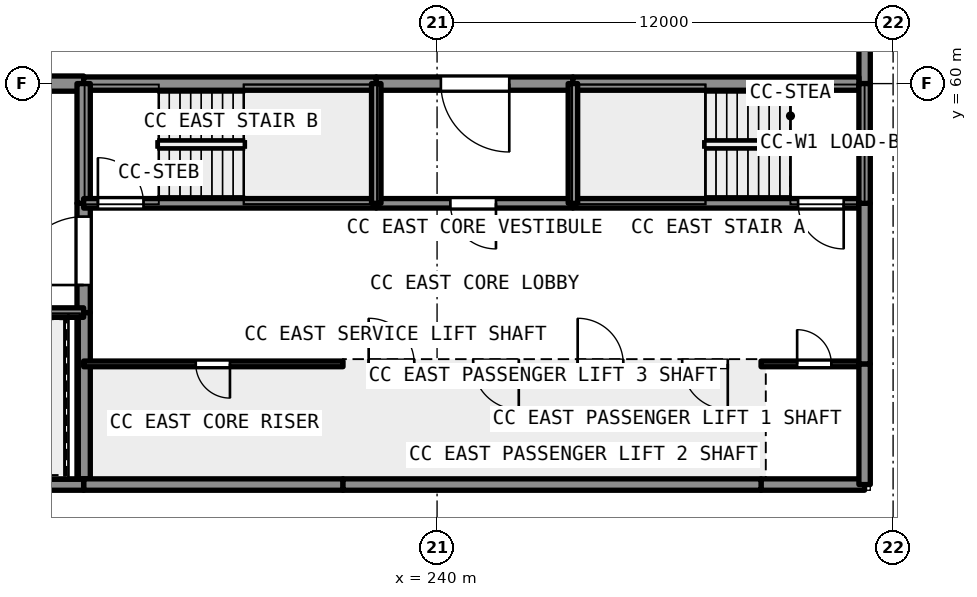
"""IFC4 building model, lengths in metres.
Left out: names, types, materials, properties, quantities, classifications, styles, units other than length and angle.
Written with IfcOpenShell. Run it as: python <this file> out.ifc"""

import sys

from ifc_helpers import new_model, si_unit, direction, frame, frame_2d, origin, place, context, subcontext, project, spatial, rectangle, extrude, element, fill, save


model = new_model("IFC4")
c1 = context("Model", 3, precision=1e-05, world=origin(), true_north=direction((0.0, 1.0)))
c2 = subcontext(c1, "Body", "Model", "MODEL_VIEW")
j1 = project(units=[si_unit("LENGTHUNIT", "METRE"), si_unit("PLANEANGLEUNIT", "RADIAN")], contexts=[c1])
p1 = place(None, origin())
s1 = spatial("IfcSite", under=j1, at=p1, CompositionType="ELEMENT")
p2 = place(p1, origin())
s2 = spatial("IfcBuilding", under=s1, at=p2, CompositionType="ELEMENT")
p3 = place(p2, frame((0.0, 0.0, 15.0)))
s3 = spatial("IfcBuildingStorey", under=s2, at=p3, CompositionType="ELEMENT", Elevation=15.0)
p4 = place(p3, frame((230.7, 60.0, 0.0), z_axis=(0.0, 0.0, 1.0), x_axis=(-1.0, 0.0, 0.0)))
e1 = element("IfcWall", 1, at=p4, inside=s3, PredefinedType="SHEAR", context=c2, shape_type="SweptSolid", body=[
    extrude(rectangle(XDim=9.6, YDim=0.4, at=frame_2d((4.8, 0.0))), origin(), (0.0, 0.0, 1.0), 5.4),
])
p5 = place(p4, frame((3.0, 0.0, 0.0)))
e2 = element("IfcOpeningElement", 2, at=p5, cuts=e1, PredefinedType="OPENING", context=c2, shape_type="SweptSolid", body=[
    extrude(rectangle(XDim=2.4, YDim=2.4, at=frame_2d((1.2, 1.2))), frame((0.0, 0.21, 0.0), z_axis=(0.0, -1.0, 0.0), x_axis=(1.0, 0.0, 0.0)), (0.0, 0.0, 1.0), 0.421),
])
p6 = place(p3, frame((251.25, 60.0, 0.0), z_axis=(0.0, 0.0, 1.0), x_axis=(0.0, 1.0, 0.0)))
e3 = element("IfcWall", 3, at=p6, inside=s3, PredefinedType="SOLIDWALL", context=c2, shape_type="SweptSolid", body=[
    extrude(rectangle(XDim=50.55, YDim=0.3, at=frame_2d((25.275, 0.0))), origin(), (0.0, 0.0, 1.0), 5.4),
])
p7 = place(p3, frame((230.7, 60.0, 0.0), z_axis=(0.0, 0.0, 1.0), x_axis=(1.0, 0.0, 0.0)))
e4 = element("IfcWall", 4, at=p7, inside=s3, PredefinedType="SHEAR", context=c2, shape_type="SweptSolid", body=[
    extrude(rectangle(XDim=7.7, YDim=0.35, at=frame_2d((3.85, 0.0))), origin(), (0.0, 0.0, 1.0), 4.99),
])
p8 = place(p3, frame((243.575, 60.0, 0.0), z_axis=(0.0, 0.0, 1.0), x_axis=(-1.0, 0.0, 0.0)))
e5 = element("IfcWall", 5, at=p8, inside=s3, PredefinedType="SHEAR", context=c2, shape_type="SweptSolid", body=[
    extrude(rectangle(XDim=5.175, YDim=0.35, at=frame_2d((2.587, 0.0))), origin(), (0.0, 0.0, 1.0), 4.99),
])
p9 = place(p8, frame((1.675, 0.0, 0.0)))
e6 = element("IfcOpeningElement", 6, at=p9, cuts=e5, PredefinedType="OPENING", context=c2, shape_type="SweptSolid", body=[
    extrude(rectangle(XDim=1.8, YDim=2.1, at=frame_2d((0.9, 1.05))), frame((0.0, 0.186, 0.0), z_axis=(0.0, -1.0, 0.0), x_axis=(1.0, 0.0, 0.0)), (0.0, 0.0, 1.0), 0.371),
])
p10 = place(p3, frame((243.575, 60.0, 0.0), z_axis=(0.0, 0.0, 1.0), x_axis=(1.0, 0.0, 0.0)))
e7 = element("IfcWall", 7, at=p10, inside=s3, PredefinedType="SHEAR", context=c2, shape_type="SweptSolid", body=[
    extrude(rectangle(XDim=7.525, YDim=0.35, at=frame_2d((3.763, 0.0))), origin(), (0.0, 0.0, 1.0), 4.99),
])
p11 = place(p3, frame((230.7, 49.6, 0.0), z_axis=(0.0, 0.0, 1.0), x_axis=(0.0, 1.0, 0.0)))
e8 = element("IfcWall", 8, at=p11, inside=s3, PredefinedType="SHEAR", context=c2, shape_type="SweptSolid", body=[
    extrude(rectangle(XDim=4.375, YDim=0.35, at=frame_2d((2.188, 0.0))), origin(), (0.0, 0.0, 1.0), 4.99),
])
p12 = place(p3, frame((230.7, 53.975, 0.0), z_axis=(0.0, 0.0, 1.0), x_axis=(0.0, 1.0, 0.0)))
e9 = element("IfcWall", 9, at=p12, inside=s3, PredefinedType="SHEAR", context=c2, shape_type="SweptSolid", body=[
    extrude(rectangle(XDim=2.875, YDim=0.35, at=frame_2d((1.438, 0.0))), origin(), (0.0, 0.0, 1.0), 4.99),
])
p13 = place(p12, frame((0.725, 0.0, 0.0)))
e10 = element("IfcOpeningElement", 10, at=p13, cuts=e9, PredefinedType="OPENING", context=c2, shape_type="SweptSolid", body=[
    extrude(rectangle(XDim=1.8, YDim=2.1, at=frame_2d((0.9, 1.05))), frame((0.0, 0.186, 0.0), z_axis=(0.0, -1.0, 0.0), x_axis=(1.0, 0.0, 0.0)), (0.0, 0.0, 1.0), 0.371),
])
p14 = place(p3, frame((230.7, 56.85, 0.0), z_axis=(0.0, 0.0, 1.0), x_axis=(0.0, 1.0, 0.0)))
e11 = element("IfcWall", 11, at=p14, inside=s3, PredefinedType="SHEAR", context=c2, shape_type="SweptSolid", body=[
    extrude(rectangle(XDim=3.15, YDim=0.35, at=frame_2d((1.575, 0.0))), origin(), (0.0, 0.0, 1.0), 4.99),
])
p15 = place(p3, frame((238.4, 56.85, 0.0), z_axis=(0.0, 0.0, 1.0), x_axis=(-1.0, 0.0, 0.0)))
e12 = element("IfcWall", 12, at=p15, inside=s3, PredefinedType="SHEAR", context=c2, shape_type="SweptSolid", body=[
    extrude(rectangle(XDim=7.7, YDim=0.25, at=frame_2d((3.85, 0.0))), origin(), (0.0, 0.0, 1.0), 4.99),
])
p16 = place(p15, frame((6.125, 0.0, 0.0)))
e13 = element("IfcOpeningElement", 13, at=p16, cuts=e12, PredefinedType="OPENING", context=c2, shape_type="SweptSolid", body=[
    extrude(rectangle(XDim=1.2, YDim=2.1, at=frame_2d((0.6, 1.05))), frame((0.0, 0.135, 0.0), z_axis=(0.0, -1.0, 0.0), x_axis=(1.0, 0.0, 0.0)), (0.0, 0.0, 1.0), 0.271),
])
p17 = place(p3, frame((243.575, 56.85, 0.0), z_axis=(0.0, 0.0, 1.0), x_axis=(-1.0, 0.0, 0.0)))
e14 = element("IfcWall", 14, at=p17, inside=s3, PredefinedType="SHEAR", context=c2, shape_type="SweptSolid", body=[
    extrude(rectangle(XDim=5.175, YDim=0.25, at=frame_2d((2.587, 0.0))), origin(), (0.0, 0.0, 1.0), 4.99),
])
p18 = place(p17, frame((2.025, 0.0, 0.0)))
e15 = element("IfcOpeningElement", 15, at=p18, cuts=e14, PredefinedType="OPENING", context=c2, shape_type="SweptSolid", body=[
    extrude(rectangle(XDim=1.2, YDim=2.1, at=frame_2d((0.6, 1.05))), frame((0.0, 0.135, 0.0), z_axis=(0.0, -1.0, 0.0), x_axis=(1.0, 0.0, 0.0)), (0.0, 0.0, 1.0), 0.271),
])
p19 = place(p3, frame((251.1, 56.85, 0.0), z_axis=(0.0, 0.0, 1.0), x_axis=(-1.0, 0.0, 0.0)))
e16 = element("IfcWall", 16, at=p19, inside=s3, PredefinedType="SHEAR", context=c2, shape_type="SweptSolid", body=[
    extrude(rectangle(XDim=7.525, YDim=0.25, at=frame_2d((3.763, 0.0))), origin(), (0.0, 0.0, 1.0), 4.99),
])
p20 = place(p19, frame((0.4, 0.0, 0.0)))
e17 = element("IfcOpeningElement", 17, at=p20, cuts=e16, PredefinedType="OPENING", context=c2, shape_type="SweptSolid", body=[
    extrude(rectangle(XDim=1.2, YDim=2.1, at=frame_2d((0.6, 1.05))), frame((0.0, 0.135, 0.0), z_axis=(0.0, -1.0, 0.0), x_axis=(1.0, 0.0, 0.0)), (0.0, 0.0, 1.0), 0.271),
])
for number, where, z_axis, x_axis in (
    (18, (243.575, 56.85, 0.0), (0.0, 0.0, 1.0), (0.0, 1.0, 0.0)),
    (19, (238.4, 56.85, 0.0), (0.0, 0.0, 1.0), (0.0, 1.0, 0.0)),
):
    element("IfcWall", number, at=place(p3, frame(where, z_axis=z_axis, x_axis=x_axis)), inside=s3, PredefinedType="SHEAR", context=c2, shape_type="SweptSolid", body=[
        extrude(rectangle(XDim=3.15, YDim=0.25, at=frame_2d((1.575, 0.0))), origin(), (0.0, 0.0, 1.0), 4.99),
    ])
p21 = place(p2, origin())
s4 = spatial("IfcBuildingStorey", under=s2, at=p21, CompositionType="ELEMENT", Elevation=0.0)
for number, where, z_axis, x_axis in (
    (20, (248.525, 49.6, -1.2), (0.0, 0.0, 1.0), (0.0, 1.0, 0.0)),
    (21, (245.775, 49.6, -1.2), (0.0, 0.0, 1.0), (0.0, 1.0, 0.0)),
    (22, (243.025, 49.6, -1.2), (0.0, 0.0, 1.0), (0.0, 1.0, 0.0)),
    (23, (240.275, 49.6, -1.2), (0.0, 0.0, 1.0), (0.0, 1.0, 0.0)),
    (24, (237.525, 49.6, -1.2), (0.0, 0.0, 1.0), (0.0, 1.0, 0.0)),
):
    element("IfcWall", number, at=place(p21, frame(where, z_axis=z_axis, x_axis=x_axis)), inside=s4, PredefinedType="SHEAR", context=c2, shape_type="SweptSolid", body=[
        extrude(rectangle(XDim=3.025, YDim=0.25, at=frame_2d((1.512, 0.0))), origin(), (0.0, 0.0, 1.0), 26.19),
    ])
p22 = place(p21, frame((237.525, 52.625, -1.2), z_axis=(0.0, 0.0, 1.0), x_axis=(1.0, 0.0, 0.0)))
e25 = element("IfcWall", 25, at=p22, inside=s4, PredefinedType="SHEAR", context=c2, shape_type="SweptSolid", body=[
    extrude(rectangle(XDim=11.0, YDim=0.25, at=frame_2d((5.5, 0.0))), origin(), (0.0, 0.0, 1.0), 26.19),
])
p23 = place(p22, frame((8.925, 0.0, 1.2)))
e26 = element("IfcOpeningElement", 26, at=p23, cuts=e25, PredefinedType="OPENING", context=c2, shape_type="SweptSolid", body=[
    extrude(rectangle(XDim=1.2, YDim=2.1, at=frame_2d((0.6, 1.05))), frame((0.0, 0.135, 0.0), z_axis=(0.0, -1.0, 0.0), x_axis=(1.0, 0.0, 0.0)), (0.0, 0.0, 1.0), 0.271),
])
p24 = place(p22, frame((6.175, 0.0, 1.2)))
e27 = element("IfcOpeningElement", 27, at=p24, cuts=e25, PredefinedType="OPENING", context=c2, shape_type="SweptSolid", body=[
    extrude(rectangle(XDim=1.2, YDim=2.1, at=frame_2d((0.6, 1.05))), frame((0.0, 0.135, 0.0), z_axis=(0.0, -1.0, 0.0), x_axis=(1.0, 0.0, 0.0)), (0.0, 0.0, 1.0), 0.271),
])
p25 = place(p22, frame((3.425, 0.0, 1.2)))
e28 = element("IfcOpeningElement", 28, at=p25, cuts=e25, PredefinedType="OPENING", context=c2, shape_type="SweptSolid", body=[
    extrude(rectangle(XDim=1.2, YDim=2.1, at=frame_2d((0.6, 1.05))), frame((0.0, 0.135, 0.0), z_axis=(0.0, -1.0, 0.0), x_axis=(1.0, 0.0, 0.0)), (0.0, 0.0, 1.0), 0.271),
])
p26 = place(p22, frame((0.675, 0.0, 1.2)))
e29 = element("IfcOpeningElement", 29, at=p26, cuts=e25, PredefinedType="OPENING", context=c2, shape_type="SweptSolid", body=[
    extrude(rectangle(XDim=1.2, YDim=2.1, at=frame_2d((0.6, 1.05))), frame((0.0, 0.135, 0.0), z_axis=(0.0, -1.0, 0.0), x_axis=(1.0, 0.0, 0.0)), (0.0, 0.0, 1.0), 0.271),
])
p27 = place(p22, frame((8.925, 0.0, 10.2)))
e30 = element("IfcOpeningElement", 30, at=p27, cuts=e25, PredefinedType="OPENING", context=c2, shape_type="SweptSolid", body=[
    extrude(rectangle(XDim=1.2, YDim=2.1, at=frame_2d((0.6, 1.05))), frame((0.0, 0.135, 0.0), z_axis=(0.0, -1.0, 0.0), x_axis=(1.0, 0.0, 0.0)), (0.0, 0.0, 1.0), 0.271),
])
p28 = place(p22, frame((6.175, 0.0, 10.2)))
e31 = element("IfcOpeningElement", 31, at=p28, cuts=e25, PredefinedType="OPENING", context=c2, shape_type="SweptSolid", body=[
    extrude(rectangle(XDim=1.2, YDim=2.1, at=frame_2d((0.6, 1.05))), frame((0.0, 0.135, 0.0), z_axis=(0.0, -1.0, 0.0), x_axis=(1.0, 0.0, 0.0)), (0.0, 0.0, 1.0), 0.271),
])
p29 = place(p22, frame((3.425, 0.0, 10.2)))
e32 = element("IfcOpeningElement", 32, at=p29, cuts=e25, PredefinedType="OPENING", context=c2, shape_type="SweptSolid", body=[
    extrude(rectangle(XDim=1.2, YDim=2.1, at=frame_2d((0.6, 1.05))), frame((0.0, 0.135, 0.0), z_axis=(0.0, -1.0, 0.0), x_axis=(1.0, 0.0, 0.0)), (0.0, 0.0, 1.0), 0.271),
])
p30 = place(p22, frame((0.675, 0.0, 10.2)))
e33 = element("IfcOpeningElement", 33, at=p30, cuts=e25, PredefinedType="OPENING", context=c2, shape_type="SweptSolid", body=[
    extrude(rectangle(XDim=1.2, YDim=2.1, at=frame_2d((0.6, 1.05))), frame((0.0, 0.135, 0.0), z_axis=(0.0, -1.0, 0.0), x_axis=(1.0, 0.0, 0.0)), (0.0, 0.0, 1.0), 0.271),
])
p31 = place(p22, frame((8.925, 0.0, 16.2)))
e34 = element("IfcOpeningElement", 34, at=p31, cuts=e25, PredefinedType="OPENING", context=c2, shape_type="SweptSolid", body=[
    extrude(rectangle(XDim=1.2, YDim=2.1, at=frame_2d((0.6, 1.05))), frame((0.0, 0.135, 0.0), z_axis=(0.0, -1.0, 0.0), x_axis=(1.0, 0.0, 0.0)), (0.0, 0.0, 1.0), 0.271),
])
p32 = place(p22, frame((6.175, 0.0, 16.2)))
e35 = element("IfcOpeningElement", 35, at=p32, cuts=e25, PredefinedType="OPENING", context=c2, shape_type="SweptSolid", body=[
    extrude(rectangle(XDim=1.2, YDim=2.1, at=frame_2d((0.6, 1.05))), frame((0.0, 0.135, 0.0), z_axis=(0.0, -1.0, 0.0), x_axis=(1.0, 0.0, 0.0)), (0.0, 0.0, 1.0), 0.271),
])
p33 = place(p22, frame((3.425, 0.0, 16.2)))
e36 = element("IfcOpeningElement", 36, at=p33, cuts=e25, PredefinedType="OPENING", context=c2, shape_type="SweptSolid", body=[
    extrude(rectangle(XDim=1.2, YDim=2.1, at=frame_2d((0.6, 1.05))), frame((0.0, 0.135, 0.0), z_axis=(0.0, -1.0, 0.0), x_axis=(1.0, 0.0, 0.0)), (0.0, 0.0, 1.0), 0.271),
])
p34 = place(p22, frame((0.675, 0.0, 16.2)))
e37 = element("IfcOpeningElement", 37, at=p34, cuts=e25, PredefinedType="OPENING", context=c2, shape_type="SweptSolid", body=[
    extrude(rectangle(XDim=1.2, YDim=2.1, at=frame_2d((0.6, 1.05))), frame((0.0, 0.135, 0.0), z_axis=(0.0, -1.0, 0.0), x_axis=(1.0, 0.0, 0.0)), (0.0, 0.0, 1.0), 0.271),
])
p35 = place(p22, frame((8.925, 0.0, 21.6)))
e38 = element("IfcOpeningElement", 38, at=p35, cuts=e25, PredefinedType="OPENING", context=c2, shape_type="SweptSolid", body=[
    extrude(rectangle(XDim=1.2, YDim=2.1, at=frame_2d((0.6, 1.05))), frame((0.0, 0.135, 0.0), z_axis=(0.0, -1.0, 0.0), x_axis=(1.0, 0.0, 0.0)), (0.0, 0.0, 1.0), 0.271),
])
p36 = place(p22, frame((6.175, 0.0, 21.6)))
e39 = element("IfcOpeningElement", 39, at=p36, cuts=e25, PredefinedType="OPENING", context=c2, shape_type="SweptSolid", body=[
    extrude(rectangle(XDim=1.2, YDim=2.1, at=frame_2d((0.6, 1.05))), frame((0.0, 0.135, 0.0), z_axis=(0.0, -1.0, 0.0), x_axis=(1.0, 0.0, 0.0)), (0.0, 0.0, 1.0), 0.271),
])
p37 = place(p22, frame((3.425, 0.0, 21.6)))
e40 = element("IfcOpeningElement", 40, at=p37, cuts=e25, PredefinedType="OPENING", context=c2, shape_type="SweptSolid", body=[
    extrude(rectangle(XDim=1.2, YDim=2.1, at=frame_2d((0.6, 1.05))), frame((0.0, 0.135, 0.0), z_axis=(0.0, -1.0, 0.0), x_axis=(1.0, 0.0, 0.0)), (0.0, 0.0, 1.0), 0.271),
])
p38 = place(p22, frame((0.675, 0.0, 21.6)))
e41 = element("IfcOpeningElement", 41, at=p38, cuts=e25, PredefinedType="OPENING", context=c2, shape_type="SweptSolid", body=[
    extrude(rectangle(XDim=1.2, YDim=2.1, at=frame_2d((0.6, 1.05))), frame((0.0, 0.135, 0.0), z_axis=(0.0, -1.0, 0.0), x_axis=(1.0, 0.0, 0.0)), (0.0, 0.0, 1.0), 0.271),
])
p39 = place(p21, frame((237.525, 49.725, -1.2), z_axis=(0.0, 0.0, 1.0), x_axis=(1.0, 0.0, 0.0)))
e42 = element("IfcWall", 42, at=p39, inside=s4, PredefinedType="SHEAR", context=c2, shape_type="SweptSolid", body=[
    extrude(rectangle(XDim=11.0, YDim=0.25, at=frame_2d((5.5, 0.0))), origin(), (0.0, 0.0, 1.0), 26.19),
])
p40 = place(p3, frame((248.525, 49.45, 0.0), z_axis=(0.0, 0.0, 1.0), x_axis=(1.0, 0.0, 0.0)))
e43 = element("IfcWall", 43, at=p40, inside=s3, PredefinedType="SOLIDWALL", context=c2, shape_type="SweptSolid", body=[
    extrude(rectangle(XDim=2.725, YDim=0.3, at=frame_2d((1.363, 0.0))), origin(), (0.0, 0.0, 1.0), 4.99),
])
p41 = place(p3, frame((251.1, 52.625, 0.0), z_axis=(0.0, 0.0, 1.0), x_axis=(-1.0, 0.0, 0.0)))
e44 = element("IfcWall", 44, at=p41, inside=s3, PredefinedType="PARTITIONING", context=c2, shape_type="SweptSolid", body=[
    extrude(rectangle(XDim=2.575, YDim=0.15, at=frame_2d((1.288, 0.0))), origin(), (0.0, 0.0, 1.0), 4.99),
])
p42 = place(p41, frame((0.725, 0.0, 0.0)))
e45 = element("IfcOpeningElement", 45, at=p42, cuts=e44, PredefinedType="OPENING", context=c2, shape_type="SweptSolid", body=[
    extrude(rectangle(XDim=0.9, YDim=2.1, at=frame_2d((0.45, 1.05))), frame((0.0, 0.085, 0.0), z_axis=(0.0, -1.0, 0.0), x_axis=(1.0, 0.0, 0.0)), (0.0, 0.0, 1.0), 0.171),
])
p43 = place(p3, frame((251.25, 49.45, 0.0), z_axis=(0.0, 0.0, 1.0), x_axis=(0.0, 1.0, 0.0)))
e46 = element("IfcWall", 46, at=p43, inside=s3, PredefinedType="SOLIDWALL", context=c2, shape_type="SweptSolid", body=[
    extrude(rectangle(XDim=3.175, YDim=0.3, at=frame_2d((1.587, 0.0))), origin(), (0.0, 0.0, 1.0), 4.99),
])
p44 = place(p3, frame((230.7, 49.45, 0.0), z_axis=(0.0, 0.0, 1.0), x_axis=(1.0, 0.0, 0.0)))
e47 = element("IfcWall", 47, at=p44, inside=s3, PredefinedType="SOLIDWALL", context=c2, shape_type="SweptSolid", body=[
    extrude(rectangle(XDim=6.825, YDim=0.3, at=frame_2d((3.413, 0.0))), origin(), (0.0, 0.0, 1.0), 4.99),
])
p45 = place(p3, frame((237.525, 52.625, 0.0), z_axis=(0.0, 0.0, 1.0), x_axis=(-1.0, 0.0, 0.0)))
e48 = element("IfcWall", 48, at=p45, inside=s3, PredefinedType="PARTITIONING", context=c2, shape_type="SweptSolid", body=[
    extrude(rectangle(XDim=6.825, YDim=0.15, at=frame_2d((3.413, 0.0))), origin(), (0.0, 0.0, 1.0), 4.99),
])
p46 = place(p45, frame((2.975, 0.0, 0.0)))
e49 = element("IfcOpeningElement", 49, at=p46, cuts=e48, PredefinedType="OPENING", context=c2, shape_type="SweptSolid", body=[
    extrude(rectangle(XDim=0.9, YDim=2.1, at=frame_2d((0.45, 1.05))), frame((0.0, 0.085, 0.0), z_axis=(0.0, -1.0, 0.0), x_axis=(1.0, 0.0, 0.0)), (0.0, 0.0, 1.0), 0.171),
])
p47 = place(p3, frame((221.275, 49.45, 0.0), z_axis=(0.0, 0.0, 1.0), x_axis=(1.0, 0.0, 0.0)))
e50 = element("IfcWall", 50, at=p47, inside=s3, PredefinedType="SOLIDWALL", context=c2, shape_type="SweptSolid", body=[
    extrude(rectangle(XDim=9.425, YDim=0.3, at=frame_2d((4.712, 0.0))), origin(), (0.0, 0.0, 1.0), 4.99),
])
p48 = place(p3, frame((237.525, 49.45, 0.0), z_axis=(0.0, 0.0, 1.0), x_axis=(1.0, 0.0, 0.0)))
e51 = element("IfcWall", 51, at=p48, inside=s3, PredefinedType="SOLIDWALL", context=c2, shape_type="SweptSolid", body=[
    extrude(rectangle(XDim=11.0, YDim=0.3, at=frame_2d((5.5, 0.0))), origin(), (0.0, 0.0, 1.0), 4.99),
])
p49 = place(p3, frame((251.25, 52.625, 0.0), z_axis=(0.0, 0.0, 1.0), x_axis=(0.0, 1.0, 0.0)))
e52 = element("IfcWall", 52, at=p49, inside=s3, PredefinedType="SOLIDWALL", context=c2, shape_type="SweptSolid", body=[
    extrude(rectangle(XDim=4.225, YDim=0.3, at=frame_2d((2.113, 0.0))), origin(), (0.0, 0.0, 1.0), 4.99),
])
p50 = place(p3, frame((251.25, 56.85, 0.0), z_axis=(0.0, 0.0, 1.0), x_axis=(0.0, 1.0, 0.0)))
e53 = element("IfcWall", 53, at=p50, inside=s3, PredefinedType="SOLIDWALL", context=c2, shape_type="SweptSolid", body=[
    extrude(rectangle(XDim=3.15, YDim=0.3, at=frame_2d((1.575, 0.0))), origin(), (0.0, 0.0, 1.0), 4.99),
])
p51 = place(p3, frame((221.275, 53.975, 0.0), z_axis=(0.0, 0.0, 1.0), x_axis=(1.0, 0.0, 0.0)))
e54 = element("IfcWall", 54, at=p51, inside=s3, PredefinedType="SHEAR", context=c2, shape_type="SweptSolid", body=[
    extrude(rectangle(XDim=9.425, YDim=0.25, at=frame_2d((4.712, 0.0))), origin(), (0.0, 0.0, 1.0), 4.99),
])
p52 = place(p51, frame((0.425, 0.0, 0.0)))
e55 = element("IfcOpeningElement", 55, at=p52, cuts=e54, PredefinedType="OPENING", context=c2, shape_type="SweptSolid", body=[
    extrude(rectangle(XDim=2.4, YDim=2.1, at=frame_2d((1.2, 1.05))), frame((0.0, 0.135, 0.0), z_axis=(0.0, -1.0, 0.0), x_axis=(1.0, 0.0, 0.0)), (0.0, 0.0, 1.0), 0.271),
])
p53 = place(p13, origin())
e56 = element("IfcDoor", 56, at=p53, inside=s3, OperationType="DOUBLE_DOOR_SINGLE_SWING", PredefinedType="DOOR", context=c2, shape_type="SweptSolid", body=[
    extrude(rectangle(XDim=1.8, YDim=2.1, at=frame_2d((0.9, 1.05))), frame((0.0, 0.025, 0.0), z_axis=(0.0, -1.0, 0.0), x_axis=(1.0, 0.0, 0.0)), (0.0, 0.0, 1.0), 0.05),
])
fill(e10, e56)
p54 = place(p9, origin())
e57 = element("IfcDoor", 57, at=p54, inside=s3, OperationType="DOUBLE_DOOR_SINGLE_SWING", PredefinedType="DOOR", context=c2, shape_type="SweptSolid", body=[
    extrude(rectangle(XDim=1.8, YDim=2.1, at=frame_2d((0.9, 1.05))), frame((0.0, 0.025, 0.0), z_axis=(0.0, -1.0, 0.0), x_axis=(1.0, 0.0, 0.0)), (0.0, 0.0, 1.0), 0.05),
])
fill(e6, e57)
p55 = place(p20, origin())
e58 = element("IfcDoor", 58, at=p55, inside=s3, OperationType="SINGLE_SWING_LEFT", PredefinedType="DOOR", context=c2, shape_type="SweptSolid", body=[
    extrude(rectangle(XDim=1.2, YDim=2.1, at=frame_2d((0.6, 1.05))), frame((0.0, 0.025, 0.0), z_axis=(0.0, -1.0, 0.0), x_axis=(1.0, 0.0, 0.0)), (0.0, 0.0, 1.0), 0.05),
])
fill(e17, e58)
p56 = place(p16, origin())
e59 = element("IfcDoor", 59, at=p56, inside=s3, OperationType="SINGLE_SWING_RIGHT", PredefinedType="DOOR", context=c2, shape_type="SweptSolid", body=[
    extrude(rectangle(XDim=1.2, YDim=2.1, at=frame_2d((0.6, 1.05))), frame((0.0, 0.025, 0.0), z_axis=(0.0, -1.0, 0.0), x_axis=(1.0, 0.0, 0.0)), (0.0, 0.0, 1.0), 0.05),
])
fill(e13, e59)
p57 = place(p18, origin())
e60 = element("IfcDoor", 60, at=p57, inside=s3, OperationType="SINGLE_SWING_LEFT", PredefinedType="DOOR", context=c2, shape_type="SweptSolid", body=[
    extrude(rectangle(XDim=1.2, YDim=2.1, at=frame_2d((0.6, 1.05))), frame((0.0, 0.025, 0.0), z_axis=(0.0, -1.0, 0.0), x_axis=(1.0, 0.0, 0.0)), (0.0, 0.0, 1.0), 0.05),
])
fill(e15, e60)
p58 = place(p31, origin())
e61 = element("IfcDoor", 61, at=p58, inside=s3, OperationType="SLIDING_TO_RIGHT", PredefinedType="DOOR", context=c2, shape_type="SweptSolid", body=[
    extrude(rectangle(XDim=1.2, YDim=2.1, at=frame_2d((0.6, 1.05))), frame((0.0, 0.025, 0.0), z_axis=(0.0, -1.0, 0.0), x_axis=(1.0, 0.0, 0.0)), (0.0, 0.0, 1.0), 0.05),
])
fill(e34, e61)
p59 = place(p32, origin())
e62 = element("IfcDoor", 62, at=p59, inside=s3, OperationType="SLIDING_TO_LEFT", PredefinedType="DOOR", context=c2, shape_type="SweptSolid", body=[
    extrude(rectangle(XDim=1.2, YDim=2.1, at=frame_2d((0.6, 1.05))), frame((0.0, 0.025, 0.0), z_axis=(0.0, -1.0, 0.0), x_axis=(1.0, 0.0, 0.0)), (0.0, 0.0, 1.0), 0.05),
])
fill(e35, e62)
p60 = place(p33, origin())
e63 = element("IfcDoor", 63, at=p60, inside=s3, OperationType="SLIDING_TO_RIGHT", PredefinedType="DOOR", context=c2, shape_type="SweptSolid", body=[
    extrude(rectangle(XDim=1.2, YDim=2.1, at=frame_2d((0.6, 1.05))), frame((0.0, 0.025, 0.0), z_axis=(0.0, -1.0, 0.0), x_axis=(1.0, 0.0, 0.0)), (0.0, 0.0, 1.0), 0.05),
])
fill(e36, e63)
p61 = place(p34, origin())
e64 = element("IfcDoor", 64, at=p61, inside=s3, OperationType="SLIDING_TO_LEFT", PredefinedType="DOOR", context=c2, shape_type="SweptSolid", body=[
    extrude(rectangle(XDim=1.2, YDim=2.1, at=frame_2d((0.6, 1.05))), frame((0.0, 0.025, 0.0), z_axis=(0.0, -1.0, 0.0), x_axis=(1.0, 0.0, 0.0)), (0.0, 0.0, 1.0), 0.05),
])
fill(e37, e64)
p62 = place(p42, origin())
e65 = element("IfcDoor", 65, at=p62, inside=s3, OperationType="SINGLE_SWING_RIGHT", PredefinedType="DOOR", context=c2, shape_type="SweptSolid", body=[
    extrude(rectangle(XDim=0.9, YDim=2.1, at=frame_2d((0.45, 1.05))), frame((0.0, 0.025, 0.0), z_axis=(0.0, -1.0, 0.0), x_axis=(1.0, 0.0, 0.0)), (0.0, 0.0, 1.0), 0.05),
])
fill(e45, e65)
p63 = place(p46, origin())
e66 = element("IfcDoor", 66, at=p63, inside=s3, OperationType="SINGLE_SWING_LEFT", PredefinedType="DOOR", context=c2, shape_type="SweptSolid", body=[
    extrude(rectangle(XDim=0.9, YDim=2.1, at=frame_2d((0.45, 1.05))), frame((0.0, 0.025, 0.0), z_axis=(0.0, -1.0, 0.0), x_axis=(1.0, 0.0, 0.0)), (0.0, 0.0, 1.0), 0.05),
])
fill(e49, e66)
save(model, sys.argv[1])
